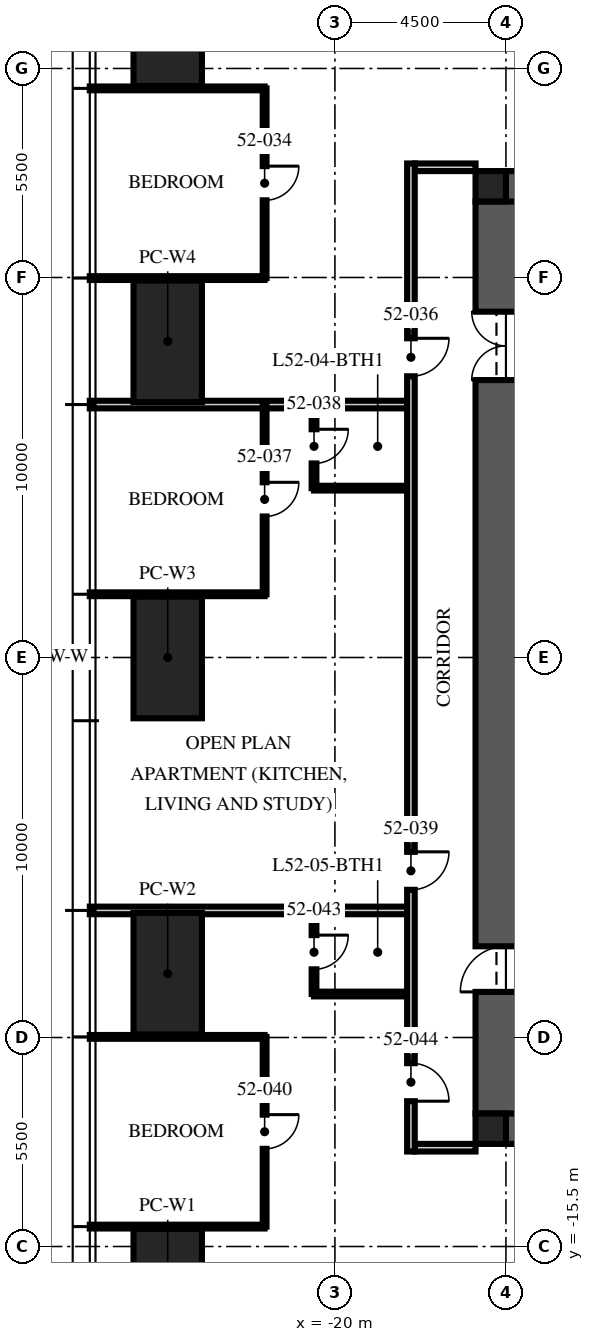
"""IFC4 building model, lengths in metres.
Left out: names, types, materials, properties, quantities, classifications, styles, units other than length and angle.
Written with IfcOpenShell. Run it as: python <this file> out.ifc"""

import sys

from ifc_helpers import new_model, si_unit, direction, frame, frame_2d, origin, origin_2d, place, context, subcontext, project, spatial, rectangle, hollow_rectangle, extrude, element, fill, save


model = new_model("IFC4")
c1 = context("Model", 3, precision=1e-05, world=origin(), true_north=direction((0.0, 1.0)))
c2 = subcontext(c1, "Body", "Model", "MODEL_VIEW")
j1 = project(units=[si_unit("LENGTHUNIT", "METRE"), si_unit("PLANEANGLEUNIT", "RADIAN")], contexts=[c1])
p1 = place(None, origin())
s1 = spatial("IfcSite", under=j1, at=p1, CompositionType="ELEMENT")
p2 = place(p1, origin())
s2 = spatial("IfcBuilding", under=s1, at=p2, CompositionType="ELEMENT")
p3 = place(p2, frame((0.0, 0.0, 210.75)))
s3 = spatial("IfcBuildingStorey", under=s2, at=p3, CompositionType="ELEMENT", Elevation=210.75)
for number, where, z_axis, x_axis in (
    (1, (-15.5, 12.0, -0.25), (0.0, 0.0, 1.0), (1.0, 0.0, 0.0)),
    (2, (-15.5, -12.0, -0.25), (0.0, 0.0, 1.0), (1.0, 0.0, 0.0)),
):
    element("IfcWall", number, at=place(p3, frame(where, z_axis=z_axis, x_axis=x_axis)), inside=s3, PredefinedType="SHEAR", context=c2, shape_type="SweptSolid", body=[
        extrude(rectangle(XDim=31.0, YDim=1.6, at=frame_2d((15.5, 0.0))), origin(), (0.0, 0.0, 1.0), 3.75),
    ])
p4 = place(p3, frame((-15.5, -12.0, -0.25), z_axis=(0.0, 0.0, 1.0), x_axis=(0.0, 1.0, 0.0)))
e3 = element("IfcWall", 3, at=p4, inside=s3, PredefinedType="SHEAR", context=c2, shape_type="SweptSolid", body=[
    extrude(rectangle(XDim=24.0, YDim=1.6, at=frame_2d((12.0, 0.0))), origin(), (0.0, 0.0, 1.0), 3.75),
])
p5 = place(p4, frame((3.2, 0.0, 0.25)))
e4 = element("IfcOpeningElement", 4, at=p5, cuts=e3, PredefinedType="OPENING", context=c2, shape_type="SweptSolid", body=[
    extrude(rectangle(XDim=1.2, YDim=2.1, at=frame_2d((0.6, 1.05))), frame((0.0, 0.81, 0.0), z_axis=(0.0, -1.0, 0.0), x_axis=(1.0, 0.0, 0.0)), (0.0, 0.0, 1.0), 1.62),
])
p6 = place(p4, frame((19.3, 0.0, 0.25)))
e5 = element("IfcOpeningElement", 5, at=p6, cuts=e3, PredefinedType="OPENING", context=c2, shape_type="SweptSolid", body=[
    extrude(rectangle(XDim=1.8, YDim=2.1, at=frame_2d((0.9, 1.05))), frame((0.0, 0.81, 0.0), z_axis=(0.0, -1.0, 0.0), x_axis=(1.0, 0.0, 0.0)), (0.0, 0.0, 1.0), 1.62),
])
for number, where, z_axis, x_axis in (
    (6, (-15.9, 12.4, -0.25), (0.0, 0.0, 1.0), (1.0, 0.0, 0.0)),
    (7, (-15.9, -12.4, -0.25), (0.0, 0.0, 1.0), (1.0, 0.0, 0.0)),
):
    element("IfcColumn", number, at=place(p3, frame(where, z_axis=z_axis, x_axis=x_axis)), inside=s3, PredefinedType="COLUMN", context=c2, shape_type="SweptSolid", body=[
        extrude(rectangle(XDim=0.8, YDim=0.8, at=origin_2d()), origin(), (0.0, 0.0, 1.0), 3.75),
    ])
for number, where, z_axis, x_axis in (
    (8, (-24.4, -16.64, 0.0), (0.0, 0.0, 1.0), (0.0, 1.0, 0.0)),
    (9, (-24.4, -8.32, 0.0), (0.0, 0.0, 1.0), (0.0, 1.0, 0.0)),
    (10, (-24.4, 0.0, 0.0), (0.0, 0.0, 1.0), (0.0, 1.0, 0.0)),
    (11, (-24.4, 8.32, 0.0), (0.0, 0.0, 1.0), (0.0, 1.0, 0.0)),
    (12, (-24.4, 16.64, 0.0), (0.0, 0.0, 1.0), (0.0, 1.0, 0.0)),
):
    element("IfcColumn", number, at=place(p3, frame(where, z_axis=z_axis, x_axis=x_axis)), inside=s3, PredefinedType="COLUMN", context=c2, shape_type="SweptSolid", body=[
        extrude(hollow_rectangle(XDim=3.2, YDim=1.8, WallThickness=0.2, at=origin_2d()), origin(), (0.0, 0.0, 1.0), 3.75),
    ])
for number, where, z_axis, x_axis in (
    (13, (-16.3, 12.9, 0.0), (0.0, 0.0, 1.0), (-1.0, 0.0, 0.0)),
    (14, (-16.3, -12.9, 0.0), (0.0, 0.0, 1.0), (-1.0, 0.0, 0.0)),
):
    element("IfcWall", number, at=place(p3, frame(where, z_axis=z_axis, x_axis=x_axis)), inside=s3, PredefinedType="PARTITIONING", context=c2, shape_type="SweptSolid", body=[
        extrude(rectangle(XDim=1.6, YDim=0.2, at=frame_2d((0.8, 0.0))), origin(), (0.0, 0.0, 1.0), 2.3),
    ])
for number, where, z_axis, x_axis in (
    (15, (-21.85, 14.976, 0.0), (0.0, 0.0, 1.0), (-1.0, 0.0, 0.0)),
    (16, (-21.85, 9.984, 0.0), (0.0, 0.0, 1.0), (-1.0, 0.0, 0.0)),
):
    element("IfcWall", number, at=place(p3, frame(where, z_axis=z_axis, x_axis=x_axis)), inside=s3, PredefinedType="PARTITIONING", context=c2, shape_type="SweptSolid", body=[
        extrude(rectangle(XDim=4.6, YDim=0.1, at=frame_2d((2.3, 0.0))), origin(), (0.0, 0.0, 1.0), 2.91),
    ])
p7 = place(p3, frame((-18.1, 6.656, 0.0), z_axis=(0.0, 0.0, 1.0), x_axis=(-1.0, 0.0, 0.0)))
e17 = element("IfcWall", 17, at=p7, inside=s3, PredefinedType="PARTITIONING", context=c2, shape_type="SweptSolid", body=[
    extrude(rectangle(XDim=8.35, YDim=0.2, at=frame_2d((4.175, 0.0))), origin(), (0.0, 0.0, 1.0), 2.91),
])
p8 = place(p3, frame((-21.85, 1.664, 0.0), z_axis=(0.0, 0.0, 1.0), x_axis=(-1.0, 0.0, 0.0)))
e18 = element("IfcWall", 18, at=p8, inside=s3, PredefinedType="PARTITIONING", context=c2, shape_type="SweptSolid", body=[
    extrude(rectangle(XDim=4.6, YDim=0.1, at=frame_2d((2.3, 0.0))), origin(), (0.0, 0.0, 1.0), 2.91),
])
p9 = place(p3, frame((-18.1, -6.656, 0.0), z_axis=(0.0, 0.0, 1.0), x_axis=(-1.0, 0.0, 0.0)))
e19 = element("IfcWall", 19, at=p9, inside=s3, PredefinedType="PARTITIONING", context=c2, shape_type="SweptSolid", body=[
    extrude(rectangle(XDim=8.35, YDim=0.2, at=frame_2d((4.175, 0.0))), origin(), (0.0, 0.0, 1.0), 2.91),
])
for number, where, z_axis, x_axis in (
    (20, (-21.85, -9.984, 0.0), (0.0, 0.0, 1.0), (-1.0, 0.0, 0.0)),
    (21, (-21.85, -14.976, 0.0), (0.0, 0.0, 1.0), (-1.0, 0.0, 0.0)),
):
    element("IfcWall", number, at=place(p3, frame(where, z_axis=z_axis, x_axis=x_axis)), inside=s3, PredefinedType="PARTITIONING", context=c2, shape_type="SweptSolid", body=[
        extrude(rectangle(XDim=4.6, YDim=0.1, at=frame_2d((2.3, 0.0))), origin(), (0.0, 0.0, 1.0), 2.91),
    ])
p10 = place(p3, frame((-21.85, 14.976, 0.0), z_axis=(0.0, 0.0, 1.0), x_axis=(0.0, -1.0, 0.0)))
e22 = element("IfcWall", 22, at=p10, inside=s3, PredefinedType="PARTITIONING", context=c2, shape_type="SweptSolid", body=[
    extrude(rectangle(XDim=4.992, YDim=0.1, at=frame_2d((2.496, 0.0))), origin(), (0.0, 0.0, 1.0), 2.81),
])
p11 = place(p10, frame((2.046, 0.0, 0.0)))
e23 = element("IfcOpeningElement", 23, at=p11, cuts=e22, PredefinedType="OPENING", context=c2, shape_type="SweptSolid", body=[
    extrude(rectangle(XDim=0.9, YDim=2.1, at=frame_2d((0.45, 1.05))), frame((0.0, 0.06, 0.0), z_axis=(0.0, -1.0, 0.0), x_axis=(1.0, 0.0, 0.0)), (0.0, 0.0, 1.0), 0.12),
])
p12 = place(p3, frame((-21.85, 6.656, 0.0), z_axis=(0.0, 0.0, 1.0), x_axis=(0.0, -1.0, 0.0)))
e24 = element("IfcWall", 24, at=p12, inside=s3, PredefinedType="PARTITIONING", context=c2, shape_type="SweptSolid", body=[
    extrude(rectangle(XDim=4.992, YDim=0.1, at=frame_2d((2.496, 0.0))), origin(), (0.0, 0.0, 1.0), 2.81),
])
p13 = place(p12, frame((2.046, 0.0, 0.0)))
e25 = element("IfcOpeningElement", 25, at=p13, cuts=e24, PredefinedType="OPENING", context=c2, shape_type="SweptSolid", body=[
    extrude(rectangle(XDim=0.9, YDim=2.1, at=frame_2d((0.45, 1.05))), frame((0.0, 0.06, 0.0), z_axis=(0.0, -1.0, 0.0), x_axis=(1.0, 0.0, 0.0)), (0.0, 0.0, 1.0), 0.12),
])
p14 = place(p3, frame((-20.55, 6.656, 0.0), z_axis=(0.0, 0.0, 1.0), x_axis=(0.0, -1.0, 0.0)))
e26 = element("IfcWall", 26, at=p14, inside=s3, PredefinedType="PARTITIONING", context=c2, shape_type="SweptSolid", body=[
    extrude(rectangle(XDim=2.2, YDim=0.125, at=frame_2d((1.1, 0.0))), origin(), (0.0, 0.0, 1.0), 3.5),
])
p15 = place(p14, frame((0.65, 0.0, 0.0)))
e27 = element("IfcOpeningElement", 27, at=p15, cuts=e26, PredefinedType="OPENING", context=c2, shape_type="SweptSolid", body=[
    extrude(rectangle(XDim=0.9, YDim=2.1, at=frame_2d((0.45, 1.05))), frame((0.0, 0.073, 0.0), z_axis=(0.0, -1.0, 0.0), x_axis=(1.0, 0.0, 0.0)), (0.0, 0.0, 1.0), 0.145),
])
p16 = place(p3, frame((-18.1, 4.456, 0.0), z_axis=(0.0, 0.0, 1.0), x_axis=(-1.0, 0.0, 0.0)))
e28 = element("IfcWall", 28, at=p16, inside=s3, PredefinedType="PARTITIONING", context=c2, shape_type="SweptSolid", body=[
    extrude(rectangle(XDim=2.45, YDim=0.125, at=frame_2d((1.225, 0.0))), origin(), (0.0, 0.0, 1.0), 3.5),
])
p17 = place(p3, frame((-21.85, -9.984, 0.0), z_axis=(0.0, 0.0, 1.0), x_axis=(0.0, -1.0, 0.0)))
e29 = element("IfcWall", 29, at=p17, inside=s3, PredefinedType="PARTITIONING", context=c2, shape_type="SweptSolid", body=[
    extrude(rectangle(XDim=4.992, YDim=0.1, at=frame_2d((2.496, 0.0))), origin(), (0.0, 0.0, 1.0), 2.81),
])
p18 = place(p17, frame((2.046, 0.0, 0.0)))
e30 = element("IfcOpeningElement", 30, at=p18, cuts=e29, PredefinedType="OPENING", context=c2, shape_type="SweptSolid", body=[
    extrude(rectangle(XDim=0.9, YDim=2.1, at=frame_2d((0.45, 1.05))), frame((0.0, 0.06, 0.0), z_axis=(0.0, -1.0, 0.0), x_axis=(1.0, 0.0, 0.0)), (0.0, 0.0, 1.0), 0.12),
])
p19 = place(p3, frame((-20.55, -6.656, 0.0), z_axis=(0.0, 0.0, 1.0), x_axis=(0.0, -1.0, 0.0)))
e31 = element("IfcWall", 31, at=p19, inside=s3, PredefinedType="PARTITIONING", context=c2, shape_type="SweptSolid", body=[
    extrude(rectangle(XDim=2.2, YDim=0.125, at=frame_2d((1.1, 0.0))), origin(), (0.0, 0.0, 1.0), 2.6),
])
p20 = place(p19, frame((0.65, 0.0, 0.0)))
e32 = element("IfcOpeningElement", 32, at=p20, cuts=e31, PredefinedType="OPENING", context=c2, shape_type="SweptSolid", body=[
    extrude(rectangle(XDim=0.9, YDim=2.1, at=frame_2d((0.45, 1.05))), frame((0.0, 0.073, 0.0), z_axis=(0.0, -1.0, 0.0), x_axis=(1.0, 0.0, 0.0)), (0.0, 0.0, 1.0), 0.145),
])
p21 = place(p3, frame((-18.1, -8.856, 0.0), z_axis=(0.0, 0.0, 1.0), x_axis=(-1.0, 0.0, 0.0)))
e33 = element("IfcWall", 33, at=p21, inside=s3, PredefinedType="PARTITIONING", context=c2, shape_type="SweptSolid", body=[
    extrude(rectangle(XDim=2.45, YDim=0.125, at=frame_2d((1.225, 0.0))), origin(), (0.0, 0.0, 1.0), 3.5),
])
p22 = place(p3, frame((-18.0, 13.0, 0.0), z_axis=(0.0, 0.0, 1.0), x_axis=(0.0, -1.0, 0.0)))
e34 = element("IfcWall", 34, at=p22, inside=s3, PredefinedType="PARTITIONING", context=c2, shape_type="SweptSolid", body=[
    extrude(rectangle(XDim=26.0, YDim=0.2, at=frame_2d((13.0, 0.0))), origin(), (0.0, 0.0, 1.0), 2.6),
])
p23 = place(p22, frame((4.6, 0.0, 0.0)))
e35 = element("IfcOpeningElement", 35, at=p23, cuts=e34, PredefinedType="OPENING", context=c2, shape_type="SweptSolid", body=[
    extrude(rectangle(XDim=1.0, YDim=2.2, at=frame_2d((0.5, 1.1))), frame((0.0, 0.11, 0.0), z_axis=(0.0, -1.0, 0.0), x_axis=(1.0, 0.0, 0.0)), (0.0, 0.0, 1.0), 0.22),
])
p24 = place(p22, frame((18.114, 0.0, 0.0)))
e36 = element("IfcOpeningElement", 36, at=p24, cuts=e34, PredefinedType="OPENING", context=c2, shape_type="SweptSolid", body=[
    extrude(rectangle(XDim=1.0, YDim=2.2, at=frame_2d((0.5, 1.1))), frame((0.0, 0.11, 0.0), z_axis=(0.0, -1.0, 0.0), x_axis=(1.0, 0.0, 0.0)), (0.0, 0.0, 1.0), 0.22),
])
p25 = place(p22, frame((23.676, 0.0, 0.0)))
e37 = element("IfcOpeningElement", 37, at=p25, cuts=e34, PredefinedType="OPENING", context=c2, shape_type="SweptSolid", body=[
    extrude(rectangle(XDim=1.0, YDim=2.2, at=frame_2d((0.5, 1.1))), frame((0.0, 0.11, 0.0), z_axis=(0.0, -1.0, 0.0), x_axis=(1.0, 0.0, 0.0)), (0.0, 0.0, 1.0), 0.22),
])
p26 = place(p5, origin())
e38 = element("IfcDoor", 38, at=p26, inside=s3, OperationType="SINGLE_SWING_LEFT", PredefinedType="DOOR", context=c2, shape_type="SweptSolid", body=[
    extrude(rectangle(XDim=1.2, YDim=2.1, at=frame_2d((0.6, 1.05))), frame((0.0, 0.025, 0.0), z_axis=(0.0, -1.0, 0.0), x_axis=(1.0, 0.0, 0.0)), (0.0, 0.0, 1.0), 0.05),
])
fill(e4, e38)
p27 = place(p6, origin())
e39 = element("IfcDoor", 39, at=p27, inside=s3, OperationType="DOUBLE_DOOR_SINGLE_SWING", PredefinedType="DOOR", context=c2, shape_type="SweptSolid", body=[
    extrude(rectangle(XDim=1.8, YDim=2.1, at=frame_2d((0.9, 1.05))), frame((0.0, 0.025, 0.0), z_axis=(0.0, -1.0, 0.0), x_axis=(1.0, 0.0, 0.0)), (0.0, 0.0, 1.0), 0.05),
])
fill(e5, e39)
p28 = place(p11, origin())
e40 = element("IfcDoor", 40, at=p28, inside=s3, OperationType="SINGLE_SWING_LEFT", PredefinedType="DOOR", context=c2, shape_type="SweptSolid", body=[
    extrude(rectangle(XDim=0.9, YDim=2.1, at=frame_2d((0.45, 1.05))), frame((0.0, 0.025, 0.0), z_axis=(0.0, -1.0, 0.0), x_axis=(1.0, 0.0, 0.0)), (0.0, 0.0, 1.0), 0.05),
])
fill(e23, e40)
p29 = place(p23, origin())
e41 = element("IfcDoor", 41, at=p29, inside=s3, OperationType="SINGLE_SWING_LEFT", PredefinedType="DOOR", context=c2, shape_type="SweptSolid", body=[
    extrude(rectangle(XDim=1.0, YDim=2.2, at=frame_2d((0.5, 1.1))), frame((0.0, 0.025, 0.0), z_axis=(0.0, -1.0, 0.0), x_axis=(1.0, 0.0, 0.0)), (0.0, 0.0, 1.0), 0.05),
])
fill(e35, e41)
p30 = place(p13, origin())
e42 = element("IfcDoor", 42, at=p30, inside=s3, OperationType="SINGLE_SWING_LEFT", PredefinedType="DOOR", context=c2, shape_type="SweptSolid", body=[
    extrude(rectangle(XDim=0.9, YDim=2.1, at=frame_2d((0.45, 1.05))), frame((0.0, 0.025, 0.0), z_axis=(0.0, -1.0, 0.0), x_axis=(1.0, 0.0, 0.0)), (0.0, 0.0, 1.0), 0.05),
])
fill(e25, e42)
p31 = place(p15, origin())
e43 = element("IfcDoor", 43, at=p31, inside=s3, OperationType="SINGLE_SWING_LEFT", PredefinedType="DOOR", context=c2, shape_type="SweptSolid", body=[
    extrude(rectangle(XDim=0.9, YDim=2.1, at=frame_2d((0.45, 1.05))), frame((0.0, 0.025, 0.0), z_axis=(0.0, -1.0, 0.0), x_axis=(1.0, 0.0, 0.0)), (0.0, 0.0, 1.0), 0.05),
])
fill(e27, e43)
p32 = place(p24, origin())
e44 = element("IfcDoor", 44, at=p32, inside=s3, OperationType="SINGLE_SWING_LEFT", PredefinedType="DOOR", context=c2, shape_type="SweptSolid", body=[
    extrude(rectangle(XDim=1.0, YDim=2.2, at=frame_2d((0.5, 1.1))), frame((0.0, 0.025, 0.0), z_axis=(0.0, -1.0, 0.0), x_axis=(1.0, 0.0, 0.0)), (0.0, 0.0, 1.0), 0.05),
])
fill(e36, e44)
p33 = place(p18, origin())
e45 = element("IfcDoor", 45, at=p33, inside=s3, OperationType="SINGLE_SWING_LEFT", PredefinedType="DOOR", context=c2, shape_type="SweptSolid", body=[
    extrude(rectangle(XDim=0.9, YDim=2.1, at=frame_2d((0.45, 1.05))), frame((0.0, 0.025, 0.0), z_axis=(0.0, -1.0, 0.0), x_axis=(1.0, 0.0, 0.0)), (0.0, 0.0, 1.0), 0.05),
])
fill(e30, e45)
p34 = place(p20, origin())
e46 = element("IfcDoor", 46, at=p34, inside=s3, OperationType="SINGLE_SWING_LEFT", PredefinedType="DOOR", context=c2, shape_type="SweptSolid", body=[
    extrude(rectangle(XDim=0.9, YDim=2.1, at=frame_2d((0.45, 1.05))), frame((0.0, 0.025, 0.0), z_axis=(0.0, -1.0, 0.0), x_axis=(1.0, 0.0, 0.0)), (0.0, 0.0, 1.0), 0.05),
])
fill(e32, e46)
p35 = place(p25, origin())
e47 = element("IfcDoor", 47, at=p35, inside=s3, OperationType="SINGLE_SWING_RIGHT", PredefinedType="DOOR", context=c2, shape_type="SweptSolid", body=[
    extrude(rectangle(XDim=1.0, YDim=2.2, at=frame_2d((0.5, 1.1))), frame((0.0, 0.025, 0.0), z_axis=(0.0, -1.0, 0.0), x_axis=(1.0, 0.0, 0.0)), (0.0, 0.0, 1.0), 0.05),
])
fill(e37, e47)
save(model, sys.argv[1])
